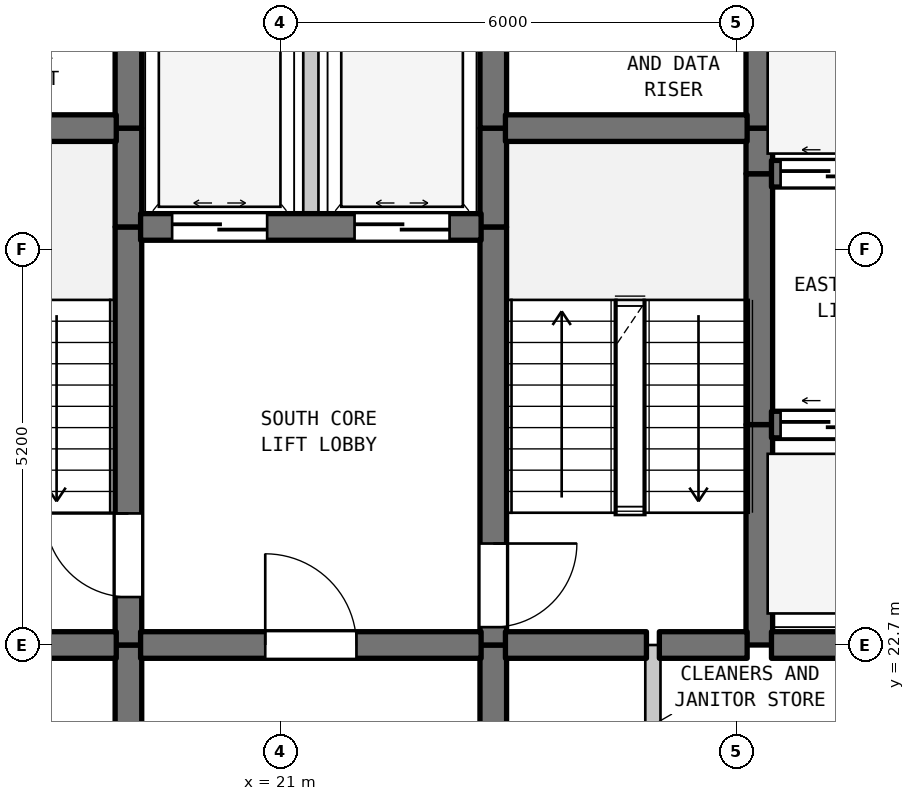
"""IFC4 building model, lengths in metres.
Left out: names, types, materials, properties, quantities, classifications, styles, units other than length and angle.
Written with IfcOpenShell. Run it as: python <this file> out.ifc"""

import sys

from ifc_helpers import new_model, si_unit, direction, frame, frame_2d, origin, place, context, subcontext, project, spatial, rectangle, extrude, element, fill, save


model = new_model("IFC4")
c1 = context("Model", 3, precision=1e-05, world=origin(), true_north=direction((0.0, 1.0)))
c2 = subcontext(c1, "Body", "Model", "MODEL_VIEW")
j1 = project(units=[si_unit("LENGTHUNIT", "METRE"), si_unit("PLANEANGLEUNIT", "RADIAN")], contexts=[c1])
p1 = place(None, origin())
s1 = spatial("IfcSite", under=j1, at=p1, CompositionType="ELEMENT")
p2 = place(p1, origin())
s2 = spatial("IfcBuilding", under=s1, at=p2, CompositionType="ELEMENT")
p3 = place(p2, frame((0.0, 0.0, 140.9)))
s3 = spatial("IfcBuildingStorey", under=s2, at=p3, CompositionType="ELEMENT", Elevation=140.9)
p4 = place(p3, frame((19.0, 19.5, 0.0), z_axis=(0.0, 0.0, 1.0), x_axis=(0.0, 1.0, 0.0)))
e1 = element("IfcWall", 1, at=p4, inside=s3, PredefinedType="SHEAR", context=c2, shape_type="SweptSolid", body=[
    extrude(rectangle(XDim=3.2, YDim=0.35, at=frame_2d((1.6, 0.0))), origin(), (0.0, 0.0, 1.0), 3.385),
])
p5 = place(p3, frame((19.0, 22.7, 0.0), z_axis=(0.0, 0.0, 1.0), x_axis=(0.0, 1.0, 0.0)))
e2 = element("IfcWall", 2, at=p5, inside=s3, PredefinedType="SHEAR", context=c2, shape_type="SweptSolid", body=[
    extrude(rectangle(XDim=5.5, YDim=0.35, at=frame_2d((2.75, 0.0))), origin(), (0.0, 0.0, 1.0), 3.385),
])
p6 = place(p5, frame((0.631, 0.0, 0.0)))
e3 = element("IfcOpeningElement", 3, at=p6, cuts=e2, PredefinedType="OPENING", context=c2, shape_type="SweptSolid", body=[
    extrude(rectangle(XDim=1.1, YDim=2.15, at=frame_2d((0.55, 1.075))), frame((0.0, 0.185, 0.0), z_axis=(0.0, -1.0, 0.0), x_axis=(1.0, 0.0, 0.0)), (0.0, 0.0, 1.0), 0.37),
])
p7 = place(p3, frame((19.0, 28.2, 0.0), z_axis=(0.0, 0.0, 1.0), x_axis=(0.0, 1.0, 0.0)))
e4 = element("IfcWall", 4, at=p7, inside=s3, PredefinedType="SHEAR", context=c2, shape_type="SweptSolid", body=[
    extrude(rectangle(XDim=1.3, YDim=0.35, at=frame_2d((0.65, 0.0))), origin(), (0.0, 0.0, 1.0), 3.385),
])
p8 = place(p3, frame((19.0, 29.5, 0.0), z_axis=(0.0, 0.0, 1.0), x_axis=(0.0, 1.0, 0.0)))
e5 = element("IfcWall", 5, at=p8, inside=s3, PredefinedType="SHEAR", context=c2, shape_type="SweptSolid", body=[
    extrude(rectangle(XDim=5.5, YDim=0.35, at=frame_2d((2.75, 0.0))), origin(), (0.0, 0.0, 1.0), 3.385),
])
p9 = place(p8, frame((2.025, 0.0, 0.0)))
e6 = element("IfcOpeningElement", 6, at=p9, cuts=e5, PredefinedType="OPENING", context=c2, shape_type="SweptSolid", body=[
    extrude(rectangle(XDim=1.1, YDim=2.15, at=frame_2d((0.55, 1.075))), frame((0.0, 0.185, 0.0), z_axis=(0.0, -1.0, 0.0), x_axis=(1.0, 0.0, 0.0)), (0.0, 0.0, 1.0), 0.37),
])
p10 = place(p3, frame((21.4, 28.2, 0.0), z_axis=(0.0, 0.0, 1.0), x_axis=(0.0, 1.0, 0.0)))
e7 = element("IfcWall", 7, at=p10, inside=s3, PredefinedType="STANDARD", context=c2, shape_type="SweptSolid", body=[
    extrude(rectangle(XDim=2.6, YDim=0.2, at=frame_2d((1.3, 0.0))), origin(), (0.0, 0.0, 1.0), 3.385),
])
p11 = place(p3, frame((23.8, 19.5, 0.0), z_axis=(0.0, 0.0, 1.0), x_axis=(0.0, 1.0, 0.0)))
e8 = element("IfcWall", 8, at=p11, inside=s3, PredefinedType="SHEAR", context=c2, shape_type="SweptSolid", body=[
    extrude(rectangle(XDim=3.2, YDim=0.35, at=frame_2d((1.6, 0.0))), origin(), (0.0, 0.0, 1.0), 3.385),
])
p12 = place(p3, frame((23.8, 22.7, 0.0), z_axis=(0.0, 0.0, 1.0), x_axis=(0.0, 1.0, 0.0)))
e9 = element("IfcWall", 9, at=p12, inside=s3, PredefinedType="SHEAR", context=c2, shape_type="SweptSolid", body=[
    extrude(rectangle(XDim=5.5, YDim=0.35, at=frame_2d((2.75, 0.0))), origin(), (0.0, 0.0, 1.0), 3.385),
])
p13 = place(p12, frame((0.235, 0.0, 0.0)))
e10 = element("IfcOpeningElement", 10, at=p13, cuts=e9, PredefinedType="OPENING", context=c2, shape_type="SweptSolid", body=[
    extrude(rectangle(XDim=1.1, YDim=2.15, at=frame_2d((0.55, 1.075))), frame((0.0, 0.185, 0.0), z_axis=(0.0, -1.0, 0.0), x_axis=(1.0, 0.0, 0.0)), (0.0, 0.0, 1.0), 0.37),
])
for number, where, z_axis, x_axis in (
    (11, (23.8, 28.2, 0.0), (0.0, 0.0, 1.0), (0.0, 1.0, 0.0)),
    (12, (23.8, 29.5, 0.0), (0.0, 0.0, 1.0), (0.0, 1.0, 0.0)),
):
    element("IfcWall", number, at=place(p3, frame(where, z_axis=z_axis, x_axis=x_axis)), inside=s3, PredefinedType="SHEAR", context=c2, shape_type="SweptSolid", body=[
        extrude(rectangle(XDim=1.3, YDim=0.35, at=frame_2d((0.65, 0.0))), origin(), (0.0, 0.0, 1.0), 3.385),
    ])
p14 = place(p3, frame((25.9, 19.5, 0.0), z_axis=(0.0, 0.0, 1.0), x_axis=(0.0, 1.0, 0.0)))
e13 = element("IfcWall", 13, at=p14, inside=s3, PredefinedType="STANDARD", context=c2, shape_type="SweptSolid", body=[
    extrude(rectangle(XDim=3.2, YDim=0.2, at=frame_2d((1.6, 0.0))), origin(), (0.0, 0.0, 1.0), 3.385),
])
p15 = place(p3, frame((27.3, 22.7, 0.0), z_axis=(0.0, 0.0, 1.0), x_axis=(0.0, 1.0, 0.0)))
e14 = element("IfcWall", 14, at=p15, inside=s3, PredefinedType="SHEAR", context=c2, shape_type="SweptSolid", body=[
    extrude(rectangle(XDim=2.9, YDim=0.35, at=frame_2d((1.45, 0.0))), origin(), (0.0, 0.0, 1.0), 3.385),
])
p16 = place(p3, frame((27.3, 25.6, 0.0), z_axis=(0.0, 0.0, 1.0), x_axis=(0.0, 1.0, 0.0)))
e15 = element("IfcWall", 15, at=p16, inside=s3, PredefinedType="SHEAR", context=c2, shape_type="SweptSolid", body=[
    extrude(rectangle(XDim=3.3, YDim=0.35, at=frame_2d((1.65, 0.0))), origin(), (0.0, 0.0, 1.0), 3.385),
])
p17 = place(p3, frame((27.3, 28.9, 0.0), z_axis=(0.0, 0.0, 1.0), x_axis=(0.0, 1.0, 0.0)))
e16 = element("IfcWall", 16, at=p17, inside=s3, PredefinedType="SHEAR", context=c2, shape_type="SweptSolid", body=[
    extrude(rectangle(XDim=0.6, YDim=0.35, at=frame_2d((0.3, 0.0))), origin(), (0.0, 0.0, 1.0), 3.385),
])
p18 = place(p3, frame((27.3, 29.5, 0.0), z_axis=(0.0, 0.0, 1.0), x_axis=(0.0, 1.0, 0.0)))
e17 = element("IfcWall", 17, at=p18, inside=s3, PredefinedType="SHEAR", context=c2, shape_type="SweptSolid", body=[
    extrude(rectangle(XDim=2.0, YDim=0.35, at=frame_2d((1.0, 0.0))), origin(), (0.0, 0.0, 1.0), 3.385),
])
p19 = place(p3, frame((15.16, 22.7, 0.0), z_axis=(0.0, 0.0, 1.0), x_axis=(1.0, 0.0, 0.0)))
e18 = element("IfcWall", 18, at=p19, inside=s3, PredefinedType="SHEAR", context=c2, shape_type="SweptSolid", body=[
    extrude(rectangle(XDim=3.68, YDim=0.35, at=frame_2d((1.84, 0.0))), origin(), (0.0, 0.0, 1.0), 3.385),
])
p20 = place(p3, frame((19.16, 22.7, 0.0), z_axis=(0.0, 0.0, 1.0), x_axis=(1.0, 0.0, 0.0)))
e19 = element("IfcWall", 19, at=p20, inside=s3, PredefinedType="SHEAR", context=c2, shape_type="SweptSolid", body=[
    extrude(rectangle(XDim=4.48, YDim=0.35, at=frame_2d((2.24, 0.0))), origin(), (0.0, 0.0, 1.0), 3.385),
])
p21 = place(p20, frame((1.64, 0.0, 0.0)))
e20 = element("IfcOpeningElement", 20, at=p21, cuts=e19, PredefinedType="OPENING", context=c2, shape_type="SweptSolid", body=[
    extrude(rectangle(XDim=1.2, YDim=2.2, at=frame_2d((0.6, 1.1))), frame((0.0, 0.185, 0.0), z_axis=(0.0, -1.0, 0.0), x_axis=(1.0, 0.0, 0.0)), (0.0, 0.0, 1.0), 0.37),
])
p22 = place(p3, frame((23.96, 22.7, 0.0), z_axis=(0.0, 0.0, 1.0), x_axis=(1.0, 0.0, 0.0)))
e21 = element("IfcWall", 21, at=p22, inside=s3, PredefinedType="SHEAR", context=c2, shape_type="SweptSolid", body=[
    extrude(rectangle(XDim=1.855, YDim=0.35, at=frame_2d((0.927, 0.0))), origin(), (0.0, 0.0, 1.0), 3.385),
])
p23 = place(p3, frame((25.985, 22.7, 0.0), z_axis=(0.0, 0.0, 1.0), x_axis=(1.0, 0.0, 0.0)))
e22 = element("IfcWall", 22, at=p23, inside=s3, PredefinedType="SHEAR", context=c2, shape_type="SweptSolid", body=[
    extrude(rectangle(XDim=1.155, YDim=0.35, at=frame_2d((0.577, 0.0))), origin(), (0.0, 0.0, 1.0), 3.385),
])
p24 = place(p3, frame((27.46, 22.7, 0.0), z_axis=(0.0, 0.0, 1.0), x_axis=(1.0, 0.0, 0.0)))
e23 = element("IfcWall", 23, at=p24, inside=s3, PredefinedType="SHEAR", context=c2, shape_type="SweptSolid", body=[
    extrude(rectangle(XDim=3.18, YDim=0.35, at=frame_2d((1.59, 0.0))), origin(), (0.0, 0.0, 1.0), 3.385),
])
p25 = place(p3, frame((27.46, 25.6, 0.0), z_axis=(0.0, 0.0, 1.0), x_axis=(1.0, 0.0, 0.0)))
e24 = element("IfcWall", 24, at=p25, inside=s3, PredefinedType="SHEAR", context=c2, shape_type="SweptSolid", body=[
    extrude(rectangle(XDim=3.18, YDim=0.35, at=frame_2d((1.59, 0.0))), origin(), (0.0, 0.0, 1.0), 3.385),
])
p26 = place(p25, frame((0.12, 0.0, 0.0)))
e25 = element("IfcOpeningElement", 25, at=p26, cuts=e24, PredefinedType="OPENING", context=c2, shape_type="SweptSolid", body=[
    extrude(rectangle(XDim=1.25, YDim=2.2, at=frame_2d((0.625, 1.1))), frame((0.0, 0.185, 0.0), z_axis=(0.0, -1.0, 0.0), x_axis=(1.0, 0.0, 0.0)), (0.0, 0.0, 1.0), 0.37),
])
p27 = place(p25, frame((1.81, 0.0, 0.0)))
e26 = element("IfcOpeningElement", 26, at=p27, cuts=e24, PredefinedType="OPENING", context=c2, shape_type="SweptSolid", body=[
    extrude(rectangle(XDim=1.25, YDim=2.2, at=frame_2d((0.625, 1.1))), frame((0.0, 0.185, 0.0), z_axis=(0.0, -1.0, 0.0), x_axis=(1.0, 0.0, 0.0)), (0.0, 0.0, 1.0), 0.37),
])
p28 = place(p3, frame((19.16, 28.2, 0.0), z_axis=(0.0, 0.0, 1.0), x_axis=(1.0, 0.0, 0.0)))
e27 = element("IfcWall", 27, at=p28, inside=s3, PredefinedType="SHEAR", context=c2, shape_type="SweptSolid", body=[
    extrude(rectangle(XDim=4.48, YDim=0.35, at=frame_2d((2.24, 0.0))), origin(), (0.0, 0.0, 1.0), 3.385),
])
p29 = place(p28, frame((0.415, 0.0, 0.0)))
e28 = element("IfcOpeningElement", 28, at=p29, cuts=e27, PredefinedType="OPENING", context=c2, shape_type="SweptSolid", body=[
    extrude(rectangle(XDim=1.25, YDim=2.2, at=frame_2d((0.625, 1.1))), frame((0.0, 0.185, 0.0), z_axis=(0.0, -1.0, 0.0), x_axis=(1.0, 0.0, 0.0)), (0.0, 0.0, 1.0), 0.37),
])
p30 = place(p28, frame((2.815, 0.0, 0.0)))
e29 = element("IfcOpeningElement", 29, at=p30, cuts=e27, PredefinedType="OPENING", context=c2, shape_type="SweptSolid", body=[
    extrude(rectangle(XDim=1.25, YDim=2.2, at=frame_2d((0.625, 1.1))), frame((0.0, 0.185, 0.0), z_axis=(0.0, -1.0, 0.0), x_axis=(1.0, 0.0, 0.0)), (0.0, 0.0, 1.0), 0.37),
])
p31 = place(p3, frame((27.46, 28.9, 0.0), z_axis=(0.0, 0.0, 1.0), x_axis=(1.0, 0.0, 0.0)))
e30 = element("IfcWall", 30, at=p31, inside=s3, PredefinedType="SHEAR", context=c2, shape_type="SweptSolid", body=[
    extrude(rectangle(XDim=3.18, YDim=0.35, at=frame_2d((1.59, 0.0))), origin(), (0.0, 0.0, 1.0), 3.385),
])
p32 = place(p31, frame((0.12, 0.0, 0.0)))
e31 = element("IfcOpeningElement", 31, at=p32, cuts=e30, PredefinedType="OPENING", context=c2, shape_type="SweptSolid", body=[
    extrude(rectangle(XDim=1.25, YDim=2.2, at=frame_2d((0.625, 1.1))), frame((0.0, 0.185, 0.0), z_axis=(0.0, -1.0, 0.0), x_axis=(1.0, 0.0, 0.0)), (0.0, 0.0, 1.0), 0.37),
])
p33 = place(p31, frame((1.81, 0.0, 0.0)))
e32 = element("IfcOpeningElement", 32, at=p33, cuts=e30, PredefinedType="OPENING", context=c2, shape_type="SweptSolid", body=[
    extrude(rectangle(XDim=1.25, YDim=2.2, at=frame_2d((0.625, 1.1))), frame((0.0, 0.185, 0.0), z_axis=(0.0, -1.0, 0.0), x_axis=(1.0, 0.0, 0.0)), (0.0, 0.0, 1.0), 0.37),
])
p34 = place(p3, frame((15.16, 29.5, 0.0), z_axis=(0.0, 0.0, 1.0), x_axis=(1.0, 0.0, 0.0)))
e33 = element("IfcWall", 33, at=p34, inside=s3, PredefinedType="SHEAR", context=c2, shape_type="SweptSolid", body=[
    extrude(rectangle(XDim=3.68, YDim=0.35, at=frame_2d((1.84, 0.0))), origin(), (0.0, 0.0, 1.0), 3.385),
])
p35 = place(p3, frame((23.96, 29.5, 0.0), z_axis=(0.0, 0.0, 1.0), x_axis=(1.0, 0.0, 0.0)))
e34 = element("IfcWall", 34, at=p35, inside=s3, PredefinedType="SHEAR", context=c2, shape_type="SweptSolid", body=[
    extrude(rectangle(XDim=3.18, YDim=0.35, at=frame_2d((1.59, 0.0))), origin(), (0.0, 0.0, 1.0), 3.385),
])
p36 = place(p6, origin())
e35 = element("IfcDoor", 35, at=p36, inside=s3, OperationType="SINGLE_SWING_RIGHT", PredefinedType="DOOR", context=c2, shape_type="SweptSolid", body=[
    extrude(rectangle(XDim=1.1, YDim=2.15, at=frame_2d((0.55, 1.075))), frame((0.0, 0.025, 0.0), z_axis=(0.0, -1.0, 0.0), x_axis=(1.0, 0.0, 0.0)), (0.0, 0.0, 1.0), 0.05),
])
fill(e3, e35)
p37 = place(p13, frame((1.1, 0.0, 0.0), z_axis=(0.0, 0.0, 1.0), x_axis=(-1.0, 0.0, 0.0)))
e36 = element("IfcDoor", 36, at=p37, inside=s3, OperationType="SINGLE_SWING_RIGHT", PredefinedType="DOOR", context=c2, shape_type="SweptSolid", body=[
    extrude(rectangle(XDim=1.1, YDim=2.15, at=frame_2d((0.55, 1.075))), frame((0.0, 0.025, 0.0), z_axis=(0.0, -1.0, 0.0), x_axis=(1.0, 0.0, 0.0)), (0.0, 0.0, 1.0), 0.05),
])
fill(e10, e36)
p38 = place(p21, origin())
e37 = element("IfcDoor", 37, at=p38, inside=s3, OperationType="SINGLE_SWING_LEFT", PredefinedType="DOOR", context=c2, shape_type="SweptSolid", body=[
    extrude(rectangle(XDim=1.2, YDim=2.2, at=frame_2d((0.6, 1.1))), frame((0.0, 0.025, 0.0), z_axis=(0.0, -1.0, 0.0), x_axis=(1.0, 0.0, 0.0)), (0.0, 0.0, 1.0), 0.05),
])
fill(e20, e37)
p39 = place(p26, origin())
e38 = element("IfcDoor", 38, at=p39, inside=s3, OperationType="DOUBLE_DOOR_SLIDING", PredefinedType="DOOR", context=c2, shape_type="SweptSolid", body=[
    extrude(rectangle(XDim=1.25, YDim=2.2, at=frame_2d((0.625, 1.1))), frame((0.0, 0.025, 0.0), z_axis=(0.0, -1.0, 0.0), x_axis=(1.0, 0.0, 0.0)), (0.0, 0.0, 1.0), 0.05),
])
fill(e25, e38)
p40 = place(p29, origin())
e39 = element("IfcDoor", 39, at=p40, inside=s3, OperationType="DOUBLE_DOOR_SLIDING", PredefinedType="DOOR", context=c2, shape_type="SweptSolid", body=[
    extrude(rectangle(XDim=1.25, YDim=2.2, at=frame_2d((0.625, 1.1))), frame((0.0, 0.025, 0.0), z_axis=(0.0, -1.0, 0.0), x_axis=(1.0, 0.0, 0.0)), (0.0, 0.0, 1.0), 0.05),
])
fill(e28, e39)
p41 = place(p30, origin())
e40 = element("IfcDoor", 40, at=p41, inside=s3, OperationType="DOUBLE_DOOR_SLIDING", PredefinedType="DOOR", context=c2, shape_type="SweptSolid", body=[
    extrude(rectangle(XDim=1.25, YDim=2.2, at=frame_2d((0.625, 1.1))), frame((0.0, 0.025, 0.0), z_axis=(0.0, -1.0, 0.0), x_axis=(1.0, 0.0, 0.0)), (0.0, 0.0, 1.0), 0.05),
])
fill(e29, e40)
p42 = place(p32, origin())
e41 = element("IfcDoor", 41, at=p42, inside=s3, OperationType="DOUBLE_DOOR_SLIDING", PredefinedType="DOOR", context=c2, shape_type="SweptSolid", body=[
    extrude(rectangle(XDim=1.25, YDim=2.2, at=frame_2d((0.625, 1.1))), frame((0.0, 0.025, 0.0), z_axis=(0.0, -1.0, 0.0), x_axis=(1.0, 0.0, 0.0)), (0.0, 0.0, 1.0), 0.05),
])
fill(e31, e41)
save(model, sys.argv[1])
